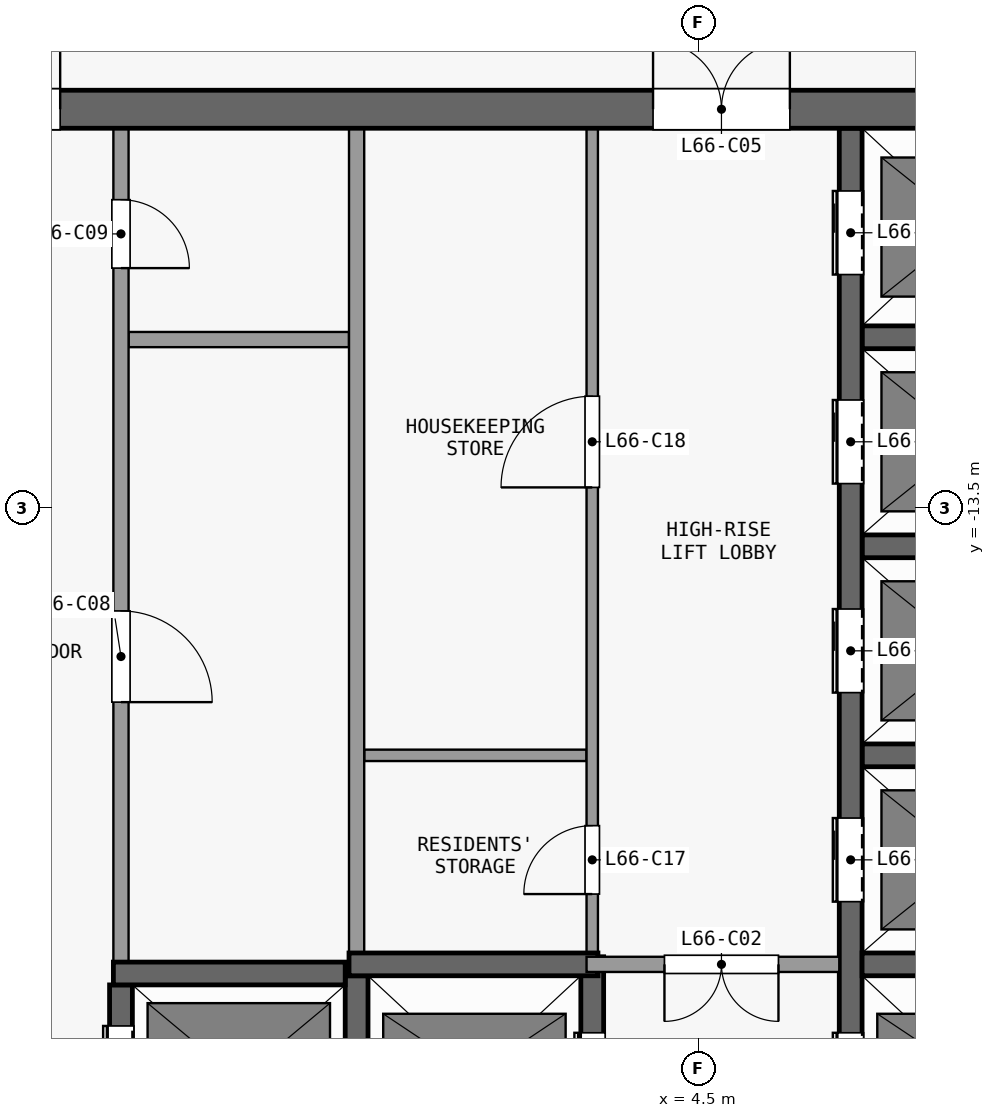
"""IFC4 building model, lengths in metres.
Left out: names, types, materials, properties, quantities, classifications, styles, units other than length and angle.
Written with IfcOpenShell. Run it as: python <this file> out.ifc"""

import sys

from ifc_helpers import new_model, si_unit, direction, frame, frame_2d, origin, place, context, subcontext, project, spatial, rectangle, extrude, element, fill, save


model = new_model("IFC4")
c1 = context("Model", 3, precision=1e-05, world=origin(), true_north=direction((0.0, 1.0)))
c2 = subcontext(c1, "Body", "Model", "MODEL_VIEW")
j1 = project(units=[si_unit("LENGTHUNIT", "METRE"), si_unit("PLANEANGLEUNIT", "RADIAN")], contexts=[c1])
p1 = place(None, origin())
s1 = spatial("IfcSite", under=j1, at=p1, CompositionType="ELEMENT")
p2 = place(p1, origin())
s2 = spatial("IfcBuilding", under=s1, at=p2, CompositionType="ELEMENT")
p3 = place(p2, frame((0.0, 0.0, 262.7)))
s3 = spatial("IfcBuildingStorey", under=s2, at=p3, CompositionType="ELEMENT", Elevation=262.7)
p4 = place(p3, frame((-13.1, -8.25, 0.0), z_axis=(0.0, 0.0, 1.0), x_axis=(1.0, 0.0, 0.0)))
e1 = element("IfcWall", 1, at=p4, inside=s3, PredefinedType="SHEAR", context=c2, shape_type="SweptSolid", body=[
    extrude(rectangle(XDim=26.2, YDim=0.5, at=frame_2d((13.1, 0.0))), origin(), (0.0, 0.0, 1.0), 3.3),
])
p5 = place(p4, frame((7.4, 0.0, 0.0)))
e2 = element("IfcOpeningElement", 2, at=p5, cuts=e1, PredefinedType="OPENING", context=c2, shape_type="SweptSolid", body=[
    extrude(rectangle(XDim=1.8, YDim=2.1, at=frame_2d((0.9, 1.05))), frame((0.0, 0.26, 0.0), z_axis=(0.0, -1.0, 0.0), x_axis=(1.0, 0.0, 0.0)), (0.0, 0.0, 1.0), 0.52),
])
p6 = place(p4, frame((17.0, 0.0, 0.0)))
e3 = element("IfcOpeningElement", 3, at=p6, cuts=e1, PredefinedType="OPENING", context=c2, shape_type="SweptSolid", body=[
    extrude(rectangle(XDim=1.8, YDim=2.1, at=frame_2d((0.9, 1.05))), frame((0.0, 0.26, 0.0), z_axis=(0.0, -1.0, 0.0), x_axis=(1.0, 0.0, 0.0)), (0.0, 0.0, 1.0), 0.52),
])
p7 = place(p4, frame((2.325, 0.0, 0.0)))
e4 = element("IfcOpeningElement", 4, at=p7, cuts=e1, PredefinedType="OPENING", context=c2, shape_type="SweptSolid", body=[
    extrude(rectangle(XDim=0.9, YDim=2.1, at=frame_2d((0.45, 1.05))), frame((0.0, 0.26, 0.0), z_axis=(0.0, -1.0, 0.0), x_axis=(1.0, 0.0, 0.0)), (0.0, 0.0, 1.0), 0.52),
])
p8 = place(p4, frame((23.675, 0.0, 0.0)))
e5 = element("IfcOpeningElement", 5, at=p8, cuts=e1, PredefinedType="OPENING", context=c2, shape_type="SweptSolid", body=[
    extrude(rectangle(XDim=1.2, YDim=2.1, at=frame_2d((0.6, 1.05))), frame((0.0, 0.26, 0.0), z_axis=(0.0, -1.0, 0.0), x_axis=(1.0, 0.0, 0.0)), (0.0, 0.0, 1.0), 0.52),
])
p9 = place(p3, frame((-3.2, -19.62, 0.0), z_axis=(0.0, 0.0, 1.0), x_axis=(1.0, 0.0, 0.0)))
e6 = element("IfcWall", 6, at=p9, inside=s3, PredefinedType="SHEAR", context=c2, shape_type="SweptSolid", body=[
    extrude(rectangle(XDim=3.05, YDim=0.3, at=frame_2d((1.525, 0.0))), origin(), (0.0, 0.0, 1.0), 3.3),
])
p10 = place(p3, frame((-0.1, -19.5, 0.0), z_axis=(0.0, 0.0, 1.0), x_axis=(1.0, 0.0, 0.0)))
e7 = element("IfcWall", 7, at=p10, inside=s3, PredefinedType="SHEAR", context=c2, shape_type="SweptSolid", body=[
    extrude(rectangle(XDim=3.275, YDim=0.3, at=frame_2d((1.638, 0.0))), origin(), (0.0, 0.0, 1.0), 3.3),
])
p11 = place(p3, frame((6.35, -19.5, 0.0), z_axis=(0.0, 0.0, 1.0), x_axis=(-1.0, 0.0, 0.0)))
e8 = element("IfcWall", 8, at=p11, inside=s3, PredefinedType="PARTITIONING", context=c2, shape_type="SweptSolid", body=[
    extrude(rectangle(XDim=3.325, YDim=0.2, at=frame_2d((1.663, 0.0))), origin(), (0.0, 0.0, 1.0), 3.3),
])
p12 = place(p11, frame((0.8, 0.0, 0.0)))
e9 = element("IfcOpeningElement", 9, at=p12, cuts=e8, PredefinedType="OPENING", context=c2, shape_type="SweptSolid", body=[
    extrude(rectangle(XDim=1.5, YDim=2.1, at=frame_2d((0.75, 1.05))), frame((0.0, 0.11, 0.0), z_axis=(0.0, -1.0, 0.0), x_axis=(1.0, 0.0, 0.0)), (0.0, 0.0, 1.0), 0.22),
])
p13 = place(p3, frame((6.65, -19.5, 0.0), z_axis=(0.0, 0.0, 1.0), x_axis=(1.0, 0.0, 0.0)))
e10 = element("IfcWall", 10, at=p13, inside=s3, PredefinedType="SHEAR", context=c2, shape_type="SweptSolid", body=[
    extrude(rectangle(XDim=2.8, YDim=0.3, at=frame_2d((1.4, 0.0))), origin(), (0.0, 0.0, 1.0), 3.3),
])
p14 = place(p3, frame((0.1, -16.75, 0.0), z_axis=(0.0, 0.0, 1.0), x_axis=(1.0, 0.0, 0.0)))
e11 = element("IfcWall", 11, at=p14, inside=s3, PredefinedType="PARTITIONING", context=c2, shape_type="SweptSolid", body=[
    extrude(rectangle(XDim=2.925, YDim=0.15, at=frame_2d((1.462, 0.0))), origin(), (0.0, 0.0, 1.0), 3.3),
])
for number, where, z_axis, x_axis in (
    (12, (6.65, -16.75, 0.0), (0.0, 0.0, 1.0), (1.0, 0.0, 0.0)),
    (13, (6.65, -14.0, 0.0), (0.0, 0.0, 1.0), (1.0, 0.0, 0.0)),
):
    element("IfcWall", number, at=place(p3, frame(where, z_axis=z_axis, x_axis=x_axis)), inside=s3, PredefinedType="SHEAR", context=c2, shape_type="SweptSolid", body=[
        extrude(rectangle(XDim=2.8, YDim=0.3, at=frame_2d((1.4, 0.0))), origin(), (0.0, 0.0, 1.0), 3.3),
    ])
p15 = place(p3, frame((-3.0, -11.28, 0.0), z_axis=(0.0, 0.0, 1.0), x_axis=(1.0, 0.0, 0.0)))
e14 = element("IfcWall", 14, at=p15, inside=s3, PredefinedType="PARTITIONING", context=c2, shape_type="SweptSolid", body=[
    extrude(rectangle(XDim=2.9, YDim=0.2, at=frame_2d((1.45, 0.0))), origin(), (0.0, 0.0, 1.0), 3.3),
])
p16 = place(p3, frame((6.65, -11.25, 0.0), z_axis=(0.0, 0.0, 1.0), x_axis=(1.0, 0.0, 0.0)))
e15 = element("IfcWall", 15, at=p16, inside=s3, PredefinedType="SHEAR", context=c2, shape_type="SweptSolid", body=[
    extrude(rectangle(XDim=2.8, YDim=0.3, at=frame_2d((1.4, 0.0))), origin(), (0.0, 0.0, 1.0), 3.3),
])
p17 = place(p3, frame((-3.1, -22.25, 0.0), z_axis=(0.0, 0.0, 1.0), x_axis=(0.0, 1.0, 0.0)))
e16 = element("IfcWall", 16, at=p17, inside=s3, PredefinedType="SHEAR", context=c2, shape_type="SweptSolid", body=[
    extrude(rectangle(XDim=2.48, YDim=0.3, at=frame_2d((1.24, 0.0))), origin(), (0.0, 0.0, 1.0), 3.3),
])
p18 = place(p17, frame((0.54, 0.0, 0.0)))
e17 = element("IfcOpeningElement", 17, at=p18, cuts=e16, PredefinedType="OPENING", context=c2, shape_type="SweptSolid", body=[
    extrude(rectangle(XDim=1.4, YDim=2.1, at=frame_2d((0.7, 1.05))), frame((0.0, 0.16, 0.0), z_axis=(0.0, -1.0, 0.0), x_axis=(1.0, 0.0, 0.0)), (0.0, 0.0, 1.0), 0.32),
])
p19 = place(p3, frame((-3.1, -8.5, 0.0), z_axis=(0.0, 0.0, 1.0), x_axis=(0.0, -1.0, 0.0)))
e18 = element("IfcWall", 18, at=p19, inside=s3, PredefinedType="PARTITIONING", context=c2, shape_type="SweptSolid", body=[
    extrude(rectangle(XDim=10.97, YDim=0.2, at=frame_2d((5.485, 0.0))), origin(), (0.0, 0.0, 1.0), 3.3),
])
p20 = place(p19, frame((6.35, 0.0, 0.0)))
e19 = element("IfcOpeningElement", 19, at=p20, cuts=e18, PredefinedType="OPENING", context=c2, shape_type="SweptSolid", body=[
    extrude(rectangle(XDim=1.2, YDim=2.1, at=frame_2d((0.6, 1.05))), frame((0.0, 0.11, 0.0), z_axis=(0.0, -1.0, 0.0), x_axis=(1.0, 0.0, 0.0)), (0.0, 0.0, 1.0), 0.22),
])
p21 = place(p19, frame((0.94, 0.0, 0.0)))
e20 = element("IfcOpeningElement", 20, at=p21, cuts=e18, PredefinedType="OPENING", context=c2, shape_type="SweptSolid", body=[
    extrude(rectangle(XDim=0.9, YDim=2.1, at=frame_2d((0.45, 1.05))), frame((0.0, 0.11, 0.0), z_axis=(0.0, -1.0, 0.0), x_axis=(1.0, 0.0, 0.0)), (0.0, 0.0, 1.0), 0.22),
])
p22 = place(p3, frame((0.0, -22.25, 0.0), z_axis=(0.0, 0.0, 1.0), x_axis=(0.0, 1.0, 0.0)))
e21 = element("IfcWall", 21, at=p22, inside=s3, PredefinedType="SHEAR", context=c2, shape_type="SweptSolid", body=[
    extrude(rectangle(XDim=2.6, YDim=0.3, at=frame_2d((1.3, 0.0))), origin(), (0.0, 0.0, 1.0), 3.3),
])
p23 = place(p3, frame((0.0, -19.35, 0.0), z_axis=(0.0, 0.0, 1.0), x_axis=(0.0, 1.0, 0.0)))
e22 = element("IfcWall", 22, at=p23, inside=s3, PredefinedType="PARTITIONING", context=c2, shape_type="SweptSolid", body=[
    extrude(rectangle(XDim=10.85, YDim=0.2, at=frame_2d((5.425, 0.0))), origin(), (0.0, 0.0, 1.0), 3.3),
])
p24 = place(p3, frame((3.1, -22.25, 0.0), z_axis=(0.0, 0.0, 1.0), x_axis=(0.0, 1.0, 0.0)))
e23 = element("IfcWall", 23, at=p24, inside=s3, PredefinedType="SHEAR", context=c2, shape_type="SweptSolid", body=[
    extrude(rectangle(XDim=2.85, YDim=0.3, at=frame_2d((1.425, 0.0))), origin(), (0.0, 0.0, 1.0), 3.3),
])
p25 = place(p24, frame((0.75, 0.0, 0.0)))
e24 = element("IfcOpeningElement", 24, at=p25, cuts=e23, PredefinedType="OPENING", context=c2, shape_type="SweptSolid", body=[
    extrude(rectangle(XDim=1.1, YDim=2.1, at=frame_2d((0.55, 1.05))), frame((0.0, 0.16, 0.0), z_axis=(0.0, -1.0, 0.0), x_axis=(1.0, 0.0, 0.0)), (0.0, 0.0, 1.0), 0.32),
])
p26 = place(p3, frame((3.1, -19.4, 0.0), z_axis=(0.0, 0.0, 1.0), x_axis=(0.0, 1.0, 0.0)))
e25 = element("IfcWall", 25, at=p26, inside=s3, PredefinedType="PARTITIONING", context=c2, shape_type="SweptSolid", body=[
    extrude(rectangle(XDim=10.9, YDim=0.15, at=frame_2d((5.45, 0.0))), origin(), (0.0, 0.0, 1.0), 3.3),
])
p27 = place(p26, frame((0.825, 0.0, 0.0)))
e26 = element("IfcOpeningElement", 26, at=p27, cuts=e25, PredefinedType="OPENING", context=c2, shape_type="SweptSolid", body=[
    extrude(rectangle(XDim=0.9, YDim=2.1, at=frame_2d((0.45, 1.05))), frame((0.0, 0.085, 0.0), z_axis=(0.0, -1.0, 0.0), x_axis=(1.0, 0.0, 0.0)), (0.0, 0.0, 1.0), 0.17),
])
p28 = place(p26, frame((6.175, 0.0, 0.0)))
e27 = element("IfcOpeningElement", 27, at=p28, cuts=e25, PredefinedType="OPENING", context=c2, shape_type="SweptSolid", body=[
    extrude(rectangle(XDim=1.2, YDim=2.1, at=frame_2d((0.6, 1.05))), frame((0.0, 0.085, 0.0), z_axis=(0.0, -1.0, 0.0), x_axis=(1.0, 0.0, 0.0)), (0.0, 0.0, 1.0), 0.17),
])
p29 = place(p3, frame((6.5, -22.55, 0.0), z_axis=(0.0, 0.0, 1.0), x_axis=(0.0, 1.0, 0.0)))
e28 = element("IfcWall", 28, at=p29, inside=s3, PredefinedType="SHEAR", context=c2, shape_type="SweptSolid", body=[
    extrude(rectangle(XDim=14.05, YDim=0.3, at=frame_2d((7.025, 0.0))), origin(), (0.0, 0.0, 1.0), 3.3),
])
p30 = place(p29, frame((1.05, 0.0, 0.0)))
e29 = element("IfcOpeningElement", 29, at=p30, cuts=e28, PredefinedType="OPENING", context=c2, shape_type="SweptSolid", body=[
    extrude(rectangle(XDim=1.1, YDim=2.1, at=frame_2d((0.55, 1.05))), frame((0.0, 0.16, 0.0), z_axis=(0.0, -1.0, 0.0), x_axis=(1.0, 0.0, 0.0)), (0.0, 0.0, 1.0), 0.32),
])
p31 = place(p29, frame((3.875, 0.0, 0.0)))
e30 = element("IfcOpeningElement", 30, at=p31, cuts=e28, PredefinedType="OPENING", context=c2, shape_type="SweptSolid", body=[
    extrude(rectangle(XDim=1.1, YDim=2.1, at=frame_2d((0.55, 1.05))), frame((0.0, 0.16, 0.0), z_axis=(0.0, -1.0, 0.0), x_axis=(1.0, 0.0, 0.0)), (0.0, 0.0, 1.0), 0.32),
])
p32 = place(p29, frame((6.625, 0.0, 0.0)))
e31 = element("IfcOpeningElement", 31, at=p32, cuts=e28, PredefinedType="OPENING", context=c2, shape_type="SweptSolid", body=[
    extrude(rectangle(XDim=1.1, YDim=2.1, at=frame_2d((0.55, 1.05))), frame((0.0, 0.16, 0.0), z_axis=(0.0, -1.0, 0.0), x_axis=(1.0, 0.0, 0.0)), (0.0, 0.0, 1.0), 0.32),
])
p33 = place(p29, frame((9.375, 0.0, 0.0)))
e32 = element("IfcOpeningElement", 32, at=p33, cuts=e28, PredefinedType="OPENING", context=c2, shape_type="SweptSolid", body=[
    extrude(rectangle(XDim=1.1, YDim=2.1, at=frame_2d((0.55, 1.05))), frame((0.0, 0.16, 0.0), z_axis=(0.0, -1.0, 0.0), x_axis=(1.0, 0.0, 0.0)), (0.0, 0.0, 1.0), 0.32),
])
p34 = place(p29, frame((12.125, 0.0, 0.0)))
e33 = element("IfcOpeningElement", 33, at=p34, cuts=e28, PredefinedType="OPENING", context=c2, shape_type="SweptSolid", body=[
    extrude(rectangle(XDim=1.1, YDim=2.1, at=frame_2d((0.55, 1.05))), frame((0.0, 0.16, 0.0), z_axis=(0.0, -1.0, 0.0), x_axis=(1.0, 0.0, 0.0)), (0.0, 0.0, 1.0), 0.32),
])
p35 = place(p25, origin())
e34 = element("IfcDoor", 34, at=p35, inside=s3, OperationType="DOUBLE_DOOR_SLIDING", PredefinedType="DOOR", context=c2, shape_type="SweptSolid", body=[
    extrude(rectangle(XDim=1.1, YDim=2.1, at=frame_2d((0.55, 1.05))), frame((0.0, 0.025, 0.0), z_axis=(0.0, -1.0, 0.0), x_axis=(1.0, 0.0, 0.0)), (0.0, 0.0, 1.0), 0.05),
])
fill(e24, e34)
p36 = place(p30, origin())
e35 = element("IfcDoor", 35, at=p36, inside=s3, OperationType="DOUBLE_DOOR_SLIDING", PredefinedType="DOOR", context=c2, shape_type="SweptSolid", body=[
    extrude(rectangle(XDim=1.1, YDim=2.1, at=frame_2d((0.55, 1.05))), frame((0.0, 0.025, 0.0), z_axis=(0.0, -1.0, 0.0), x_axis=(1.0, 0.0, 0.0)), (0.0, 0.0, 1.0), 0.05),
])
fill(e29, e35)
p37 = place(p31, origin())
e36 = element("IfcDoor", 36, at=p37, inside=s3, OperationType="DOUBLE_DOOR_SLIDING", PredefinedType="DOOR", context=c2, shape_type="SweptSolid", body=[
    extrude(rectangle(XDim=1.1, YDim=2.1, at=frame_2d((0.55, 1.05))), frame((0.0, 0.025, 0.0), z_axis=(0.0, -1.0, 0.0), x_axis=(1.0, 0.0, 0.0)), (0.0, 0.0, 1.0), 0.05),
])
fill(e30, e36)
p38 = place(p32, origin())
e37 = element("IfcDoor", 37, at=p38, inside=s3, OperationType="DOUBLE_DOOR_SLIDING", PredefinedType="DOOR", context=c2, shape_type="SweptSolid", body=[
    extrude(rectangle(XDim=1.1, YDim=2.1, at=frame_2d((0.55, 1.05))), frame((0.0, 0.025, 0.0), z_axis=(0.0, -1.0, 0.0), x_axis=(1.0, 0.0, 0.0)), (0.0, 0.0, 1.0), 0.05),
])
fill(e31, e37)
p39 = place(p33, origin())
e38 = element("IfcDoor", 38, at=p39, inside=s3, OperationType="DOUBLE_DOOR_SLIDING", PredefinedType="DOOR", context=c2, shape_type="SweptSolid", body=[
    extrude(rectangle(XDim=1.1, YDim=2.1, at=frame_2d((0.55, 1.05))), frame((0.0, 0.025, 0.0), z_axis=(0.0, -1.0, 0.0), x_axis=(1.0, 0.0, 0.0)), (0.0, 0.0, 1.0), 0.05),
])
fill(e32, e38)
p40 = place(p34, origin())
e39 = element("IfcDoor", 39, at=p40, inside=s3, OperationType="DOUBLE_DOOR_SLIDING", PredefinedType="DOOR", context=c2, shape_type="SweptSolid", body=[
    extrude(rectangle(XDim=1.1, YDim=2.1, at=frame_2d((0.55, 1.05))), frame((0.0, 0.025, 0.0), z_axis=(0.0, -1.0, 0.0), x_axis=(1.0, 0.0, 0.0)), (0.0, 0.0, 1.0), 0.05),
])
fill(e33, e39)
p41 = place(p18, origin())
e40 = element("IfcDoor", 40, at=p41, inside=s3, OperationType="DOUBLE_DOOR_SLIDING", PredefinedType="DOOR", context=c2, shape_type="SweptSolid", body=[
    extrude(rectangle(XDim=1.4, YDim=2.1, at=frame_2d((0.7, 1.05))), frame((0.0, 0.025, 0.0), z_axis=(0.0, -1.0, 0.0), x_axis=(1.0, 0.0, 0.0)), (0.0, 0.0, 1.0), 0.05),
])
fill(e17, e40)
p42 = place(p12, origin())
e41 = element("IfcDoor", 41, at=p42, inside=s3, OperationType="DOUBLE_DOOR_SINGLE_SWING", PredefinedType="DOOR", context=c2, shape_type="SweptSolid", body=[
    extrude(rectangle(XDim=1.5, YDim=2.1, at=frame_2d((0.75, 1.05))), frame((0.0, 0.025, 0.0), z_axis=(0.0, -1.0, 0.0), x_axis=(1.0, 0.0, 0.0)), (0.0, 0.0, 1.0), 0.05),
])
fill(e9, e41)
p43 = place(p5, origin())
e42 = element("IfcDoor", 42, at=p43, inside=s3, OperationType="DOUBLE_DOOR_SINGLE_SWING", PredefinedType="DOOR", context=c2, shape_type="SweptSolid", body=[
    extrude(rectangle(XDim=1.8, YDim=2.1, at=frame_2d((0.9, 1.05))), frame((0.0, 0.025, 0.0), z_axis=(0.0, -1.0, 0.0), x_axis=(1.0, 0.0, 0.0)), (0.0, 0.0, 1.0), 0.05),
])
fill(e2, e42)
p44 = place(p6, origin())
e43 = element("IfcDoor", 43, at=p44, inside=s3, OperationType="DOUBLE_DOOR_SINGLE_SWING", PredefinedType="DOOR", context=c2, shape_type="SweptSolid", body=[
    extrude(rectangle(XDim=1.8, YDim=2.1, at=frame_2d((0.9, 1.05))), frame((0.0, 0.025, 0.0), z_axis=(0.0, -1.0, 0.0), x_axis=(1.0, 0.0, 0.0)), (0.0, 0.0, 1.0), 0.05),
])
fill(e3, e43)
p45 = place(p20, origin())
e44 = element("IfcDoor", 44, at=p45, inside=s3, OperationType="SINGLE_SWING_RIGHT", PredefinedType="DOOR", context=c2, shape_type="SweptSolid", body=[
    extrude(rectangle(XDim=1.2, YDim=2.1, at=frame_2d((0.6, 1.05))), frame((0.0, 0.025, 0.0), z_axis=(0.0, -1.0, 0.0), x_axis=(1.0, 0.0, 0.0)), (0.0, 0.0, 1.0), 0.05),
])
fill(e19, e44)
p46 = place(p21, origin())
e45 = element("IfcDoor", 45, at=p46, inside=s3, OperationType="SINGLE_SWING_RIGHT", PredefinedType="DOOR", context=c2, shape_type="SweptSolid", body=[
    extrude(rectangle(XDim=0.9, YDim=2.1, at=frame_2d((0.45, 1.05))), frame((0.0, 0.025, 0.0), z_axis=(0.0, -1.0, 0.0), x_axis=(1.0, 0.0, 0.0)), (0.0, 0.0, 1.0), 0.05),
])
fill(e20, e45)
p47 = place(p27, origin())
e46 = element("IfcDoor", 46, at=p47, inside=s3, OperationType="SINGLE_SWING_LEFT", PredefinedType="DOOR", context=c2, shape_type="SweptSolid", body=[
    extrude(rectangle(XDim=0.9, YDim=2.1, at=frame_2d((0.45, 1.05))), frame((0.0, 0.025, 0.0), z_axis=(0.0, -1.0, 0.0), x_axis=(1.0, 0.0, 0.0)), (0.0, 0.0, 1.0), 0.05),
])
fill(e26, e46)
p48 = place(p28, origin())
e47 = element("IfcDoor", 47, at=p48, inside=s3, OperationType="SINGLE_SWING_LEFT", PredefinedType="DOOR", context=c2, shape_type="SweptSolid", body=[
    extrude(rectangle(XDim=1.2, YDim=2.1, at=frame_2d((0.6, 1.05))), frame((0.0, 0.025, 0.0), z_axis=(0.0, -1.0, 0.0), x_axis=(1.0, 0.0, 0.0)), (0.0, 0.0, 1.0), 0.05),
])
fill(e27, e47)
save(model, sys.argv[1])
